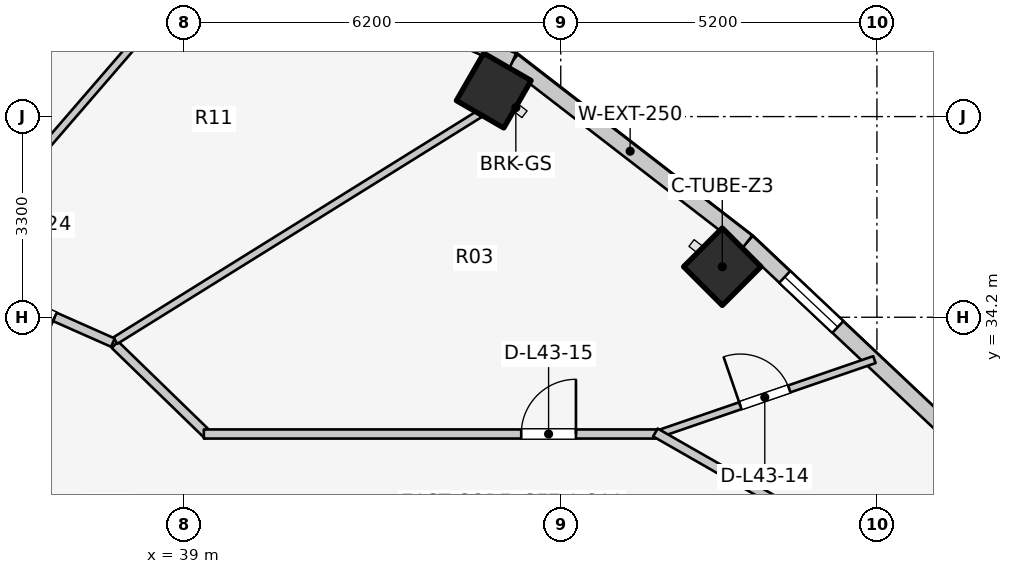
"""IFC4 building model, lengths in metres.
Left out: names, types, materials, properties, quantities, classifications, styles, units other than length and angle.
Written with IfcOpenShell. Run it as: python <this file> out.ifc"""

import sys

from ifc_helpers import new_model, si_unit, direction, frame, frame_2d, origin, origin_2d, place, context, subcontext, project, spatial, rectangle, extrude, element, fill, save


model = new_model("IFC4")
c1 = context("Model", 3, precision=1e-05, world=origin(), true_north=direction((0.0, 1.0)))
c2 = subcontext(c1, "Body", "Model", "MODEL_VIEW")
j1 = project(units=[si_unit("LENGTHUNIT", "METRE"), si_unit("PLANEANGLEUNIT", "RADIAN")], contexts=[c1])
p1 = place(None, origin())
s1 = spatial("IfcSite", under=j1, at=p1, CompositionType="ELEMENT")
p2 = place(p1, origin())
s2 = spatial("IfcBuilding", under=s1, at=p2, CompositionType="ELEMENT")
p3 = place(p2, frame((0.0, 0.0, 143.6)))
s3 = spatial("IfcBuildingStorey", under=s2, at=p3, CompositionType="ELEMENT", Elevation=143.6)
for number, where, z_axis, x_axis in (
    (1, (47.857, 35.031, 0.0), (0.0, 0.0, 1.0), (0.707, 0.707, 0.0)),
    (2, (44.098, 37.928, 0.0), (0.0, 0.0, 1.0), (0.5, 0.866, 0.0)),
):
    element("IfcColumn", number, at=place(p3, frame(where, z_axis=z_axis, x_axis=x_axis)), inside=s3, PredefinedType="COLUMN", context=c2, shape_type="SweptSolid", body=[
        extrude(rectangle(XDim=0.9, YDim=0.9, at=origin_2d()), origin(), (0.0, 0.0, 1.0), 3.1),
    ])
p4 = place(p3, frame((51.619, 32.284, 0.0), z_axis=(0.0, 0.0, 1.0), x_axis=(-0.727667301037, 0.68593024354, 0.0)))
e3 = element("IfcWall", 3, at=p4, inside=s3, PredefinedType="STANDARD", context=c2, shape_type="SweptSolid", body=[
    extrude(rectangle(XDim=4.604, YDim=0.26, at=frame_2d((2.302, 0.0))), origin(), (0.0, 0.0, 1.0), 2.85),
])
p5 = place(p4, frame((2.56, 0.0, 0.75)))
e4 = element("IfcOpeningElement", 4, at=p5, cuts=e3, PredefinedType="OPENING", context=c2, shape_type="SweptSolid", body=[
    extrude(rectangle(XDim=1.2, YDim=1.5, at=frame_2d((0.6, 0.75))), frame((0.0, 0.14, 0.0), z_axis=(0.0, -1.0, 0.0), x_axis=(1.0, 0.0, 0.0)), (0.0, 0.0, 1.0), 0.28),
])
p6 = place(p3, frame((48.269, 35.441, 0.0), z_axis=(0.0, 0.0, 1.0), x_axis=(-0.791460185804, 0.611220724687, 0.0)))
e5 = element("IfcWall", 5, at=p6, inside=s3, PredefinedType="STANDARD", context=c2, shape_type="SweptSolid", body=[
    extrude(rectangle(XDim=4.872, YDim=0.26, at=frame_2d((2.436, 0.0))), origin(), (0.0, 0.0, 1.0), 2.85),
])
p7 = place(p3, frame((44.413, 38.419, 0.0), z_axis=(0.0, 0.0, 1.0), x_axis=(-0.912353637112, 0.409403029847, 0.0)))
e6 = element("IfcWall", 6, at=p7, inside=s3, PredefinedType="STANDARD", context=c2, shape_type="SweptSolid", body=[
    extrude(rectangle(XDim=5.533, YDim=0.26, at=frame_2d((2.766, 0.0))), origin(), (0.0, 0.0, 1.0), 2.85),
])
p8 = place(p7, frame((2.016, 0.0, 0.75)))
e7 = element("IfcOpeningElement", 7, at=p8, cuts=e6, PredefinedType="OPENING", context=c2, shape_type="SweptSolid", body=[
    extrude(rectangle(XDim=1.5, YDim=1.6, at=frame_2d((0.75, 0.8))), frame((0.0, 0.14, 0.0), z_axis=(0.0, -1.0, 0.0), x_axis=(1.0, 0.0, 0.0)), (0.0, 0.0, 1.0), 0.28),
])
p9 = place(p3, frame((46.753, 32.264, 0.0), z_axis=(0.0, 0.0, 1.0), x_axis=(0.945683523506, 0.325088716151, 0.0)))
e8 = element("IfcWall", 8, at=p9, inside=s3, PredefinedType="MOVABLE", context=c2, shape_type="SweptSolid", body=[
    extrude(rectangle(XDim=3.813, YDim=0.12, at=frame_2d((1.906, 0.0))), origin(), (0.0, 0.0, 1.0), 2.22),
])
p10 = place(p9, frame((1.481, 0.0, 0.0)))
e9 = element("IfcOpeningElement", 9, at=p10, cuts=e8, PredefinedType="OPENING", context=c2, shape_type="SweptSolid", body=[
    extrude(rectangle(XDim=0.85, YDim=2.05, at=frame_2d((0.425, 1.025))), frame((0.0, 0.07, 0.0), z_axis=(0.0, -1.0, 0.0), x_axis=(1.0, 0.0, 0.0)), (0.0, 0.0, 1.0), 0.14),
])
p11 = place(p3, frame((37.867, 33.749, 0.0), z_axis=(0.0, 0.0, 1.0), x_axis=(0.717419568599, -0.696641344302, 0.0)))
e10 = element("IfcWall", 10, at=p11, inside=s3, PredefinedType="PARTITIONING", context=c2, shape_type="SweptSolid", body=[
    extrude(rectangle(XDim=2.138, YDim=0.15, at=frame_2d((1.069, 0.0))), origin(), (0.0, 0.0, 1.0), 2.299),
])
p12 = place(p3, frame((39.33, 32.28, 0.0), z_axis=(0.0, 0.0, 1.0), x_axis=(1.0, 0.0, 0.0)))
e11 = element("IfcWall", 11, at=p12, inside=s3, PredefinedType="PARTITIONING", context=c2, shape_type="SweptSolid", body=[
    extrude(rectangle(XDim=7.52, YDim=0.15, at=frame_2d((3.76, 0.0))), origin(), (0.0, 0.0, 1.0), 2.299),
])
p13 = place(p12, frame((5.22, 0.0, 0.0)))
e12 = element("IfcOpeningElement", 12, at=p13, cuts=e11, PredefinedType="OPENING", context=c2, shape_type="SweptSolid", body=[
    extrude(rectangle(XDim=0.9, YDim=2.1, at=frame_2d((0.45, 1.05))), frame((0.0, 0.085, 0.0), z_axis=(0.0, -1.0, 0.0), x_axis=(1.0, 0.0, 0.0)), (0.0, 0.0, 1.0), 0.17),
])
p14 = place(p3, frame((46.757, 32.305, 0.0), z_axis=(0.0, 0.0, 1.0), x_axis=(0.867991349648, -0.496579315857, 0.0)))
e13 = element("IfcWall", 13, at=p14, inside=s3, PredefinedType="PARTITIONING", context=c2, shape_type="SweptSolid", body=[
    extrude(rectangle(XDim=2.567, YDim=0.15, at=frame_2d((1.283, 0.0))), origin(), (0.0, 0.0, 1.0), 2.22),
])
p15 = place(p3, frame((37.875, 33.816, 0.0), z_axis=(0.0, 0.0, 1.0), x_axis=(0.849008457073, 0.528379257559, 0.0)))
e14 = element("IfcWall", 14, at=p15, inside=s3, PredefinedType="PARTITIONING", context=c2, shape_type="SweptSolid", body=[
    extrude(rectangle(XDim=7.077, YDim=0.125, at=frame_2d((3.539, 0.0))), origin(), (0.0, 0.0, 1.0), 2.299),
])
p16 = place(p3, frame((35.053, 35.073, 0.0), z_axis=(0.0, 0.0, 1.0), x_axis=(0.653779283332, 0.756685303601, 0.0)))
e15 = element("IfcWall", 15, at=p16, inside=s3, PredefinedType="PARTITIONING", context=c2, shape_type="SweptSolid", body=[
    extrude(rectangle(XDim=6.14, YDim=0.125, at=frame_2d((3.07, 0.0))), origin(), (0.0, 0.0, 1.0), 2.299),
])
p17 = place(p3, frame((37.835, 33.783, 0.0), z_axis=(0.0, 0.0, 1.0), x_axis=(-0.91445214467, 0.404694051239, 0.0)))
e16 = element("IfcWall", 16, at=p17, inside=s3, PredefinedType="PARTITIONING", context=c2, shape_type="SweptSolid", body=[
    extrude(rectangle(XDim=3.091, YDim=0.15, at=frame_2d((1.545, 0.0))), origin(), (0.0, 0.0, 1.0), 2.299),
])
p18 = place(p17, frame((1.045, 0.0, 0.0)))
e17 = element("IfcOpeningElement", 17, at=p18, cuts=e16, PredefinedType="OPENING", context=c2, shape_type="SweptSolid", body=[
    extrude(rectangle(XDim=1.0, YDim=2.1, at=frame_2d((0.5, 1.05))), frame((0.0, 0.085, 0.0), z_axis=(0.0, -1.0, 0.0), x_axis=(1.0, 0.0, 0.0)), (0.0, 0.0, 1.0), 0.17),
])
p19 = place(p5, origin())
e18 = element("IfcWindow", 18, at=p19, inside=s3, PartitioningType="SINGLE_PANEL", PredefinedType="WINDOW", context=c2, shape_type="SweptSolid", body=[
    extrude(rectangle(XDim=1.2, YDim=1.5, at=frame_2d((0.6, 0.75))), frame((0.0, 0.03, 0.0), z_axis=(0.0, -1.0, 0.0), x_axis=(1.0, 0.0, 0.0)), (0.0, 0.0, 1.0), 0.06),
])
fill(e4, e18)
p20 = place(p10, origin())
e19 = element("IfcDoor", 19, at=p20, inside=s3, OperationType="SINGLE_SWING_LEFT", PredefinedType="DOOR", context=c2, shape_type="SweptSolid", body=[
    extrude(rectangle(XDim=0.85, YDim=2.05, at=frame_2d((0.425, 1.025))), frame((0.0, 0.025, 0.0), z_axis=(0.0, -1.0, 0.0), x_axis=(1.0, 0.0, 0.0)), (0.0, 0.0, 1.0), 0.05),
])
fill(e9, e19)
p21 = place(p13, origin())
e20 = element("IfcDoor", 20, at=p21, inside=s3, OperationType="SINGLE_SWING_RIGHT", PredefinedType="DOOR", context=c2, shape_type="SweptSolid", body=[
    extrude(rectangle(XDim=0.9, YDim=2.1, at=frame_2d((0.45, 1.05))), frame((0.0, 0.025, 0.0), z_axis=(0.0, -1.0, 0.0), x_axis=(1.0, 0.0, 0.0)), (0.0, 0.0, 1.0), 0.05),
])
fill(e12, e20)
p22 = place(p18, origin())
e21 = element("IfcDoor", 21, at=p22, inside=s3, OperationType="SINGLE_SWING_LEFT", PredefinedType="DOOR", context=c2, shape_type="SweptSolid", body=[
    extrude(rectangle(XDim=1.0, YDim=2.1, at=frame_2d((0.5, 1.05))), frame((0.0, 0.025, 0.0), z_axis=(0.0, -1.0, 0.0), x_axis=(1.0, 0.0, 0.0)), (0.0, 0.0, 1.0), 0.05),
])
fill(e17, e21)
save(model, sys.argv[1])
